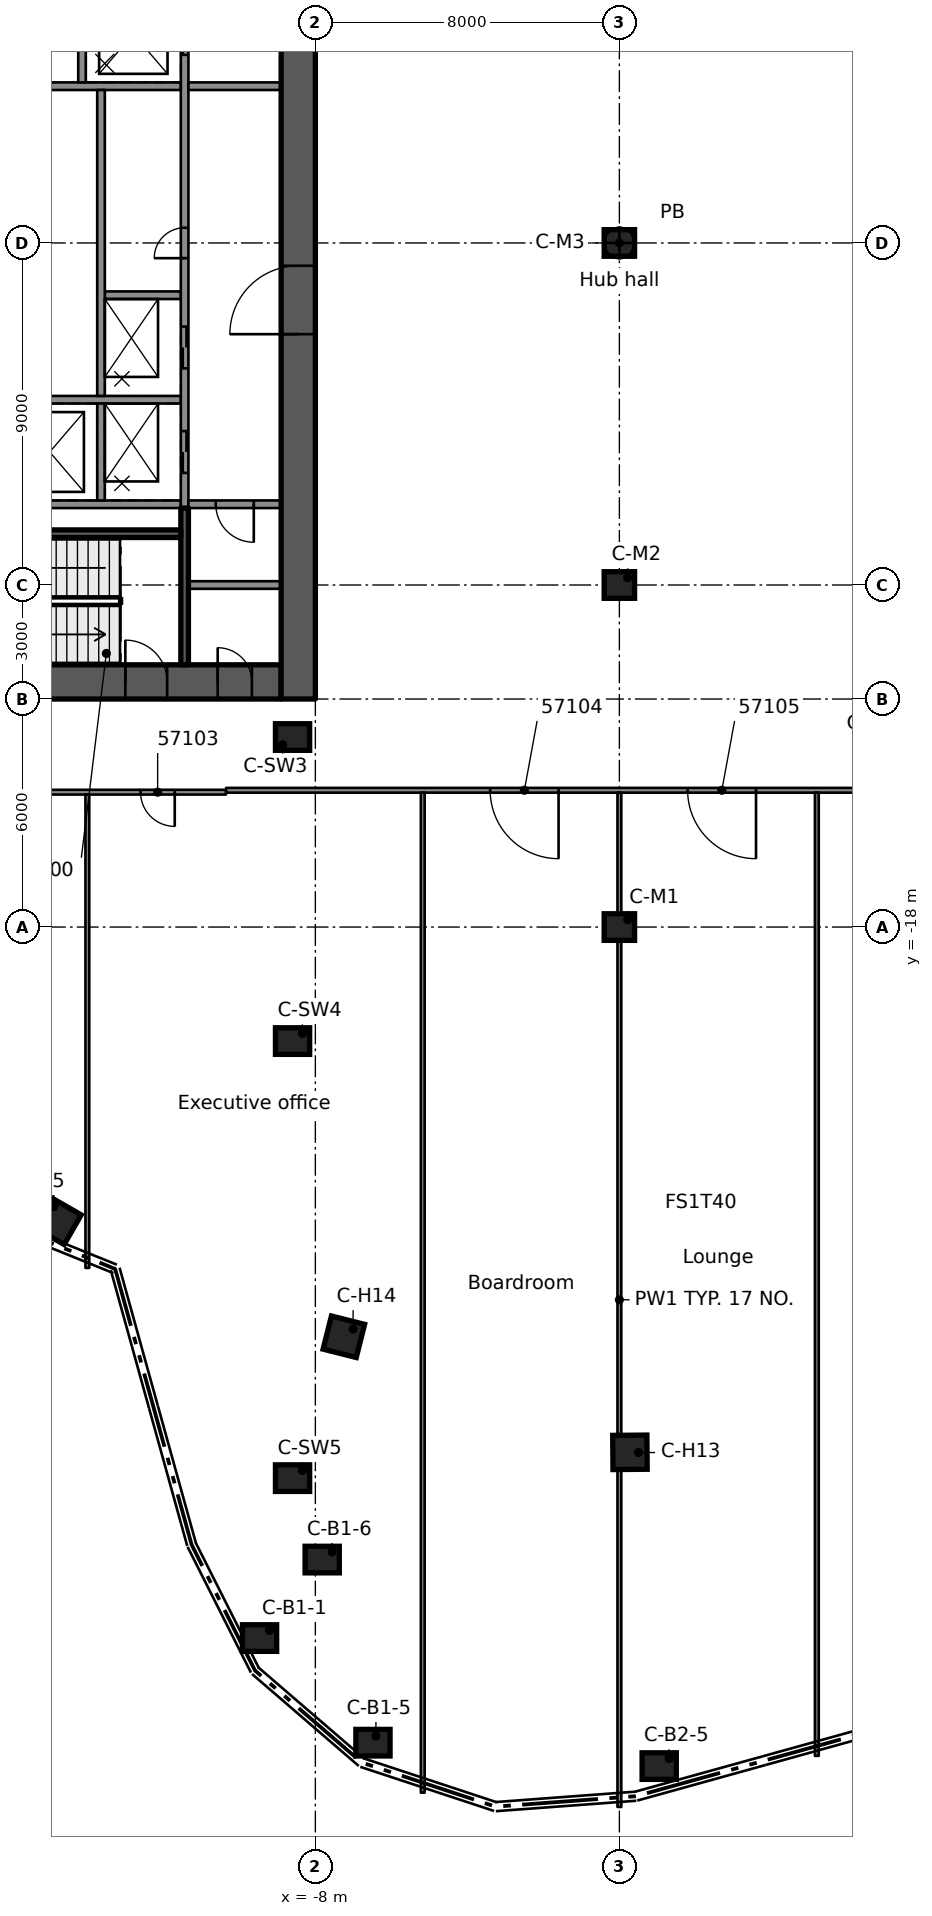
"""IFC4 building model, lengths in metres.
Left out: names, types, materials, properties, quantities, classifications, styles, units other than length and angle.
Written with IfcOpenShell. Run it as: python <this file> out.ifc"""

import sys

from ifc_helpers import new_model, si_unit, direction, frame, frame_2d, origin, origin_2d, place, context, subcontext, project, spatial, rectangle, extrude, element, fill, save


model = new_model("IFC4")
c1 = context("Model", 3, precision=1e-05, world=origin(), true_north=direction((0.0, 1.0)))
c2 = subcontext(c1, "Body", "Model", "MODEL_VIEW")
j1 = project(units=[si_unit("LENGTHUNIT", "METRE"), si_unit("PLANEANGLEUNIT", "RADIAN")], contexts=[c1])
p1 = place(None, origin())
s1 = spatial("IfcSite", under=j1, at=p1, CompositionType="ELEMENT")
p2 = place(p1, origin())
s2 = spatial("IfcBuilding", under=s1, at=p2, CompositionType="ELEMENT")
p3 = place(p2, frame((0.0, 0.0, 282.4)))
s3 = spatial("IfcBuildingStorey", under=s2, at=p3, CompositionType="ELEMENT", Elevation=282.4)
p4 = place(p3, frame((-18.1, -11.55, 0.0), z_axis=(0.0, 0.0, 1.0), x_axis=(1.0, 0.0, 0.0)))
e1 = element("IfcWall", 1, at=p4, inside=s3, PredefinedType="SHEAR", context=c2, shape_type="SweptSolid", body=[
    extrude(rectangle(XDim=9.2, YDim=0.9, at=frame_2d((4.6, 0.0))), origin(), (0.0, 0.0, 1.0), 3.5),
])
p5 = place(p4, frame((5.1, 0.0, 0.0)))
e2 = element("IfcOpeningElement", 2, at=p5, cuts=e1, PredefinedType="OPENING", context=c2, shape_type="SweptSolid", body=[
    extrude(rectangle(XDim=1.1, YDim=2.1, at=frame_2d((0.55, 1.05))), frame((0.0, 0.46, 0.0), z_axis=(0.0, -1.0, 0.0), x_axis=(1.0, 0.0, 0.0)), (0.0, 0.0, 1.0), 0.92),
])
p6 = place(p4, frame((7.53, 0.0, 0.0)))
e3 = element("IfcOpeningElement", 3, at=p6, cuts=e1, PredefinedType="OPENING", context=c2, shape_type="SweptSolid", body=[
    extrude(rectangle(XDim=0.9, YDim=2.1, at=frame_2d((0.45, 1.05))), frame((0.0, 0.46, 0.0), z_axis=(0.0, -1.0, 0.0), x_axis=(1.0, 0.0, 0.0)), (0.0, 0.0, 1.0), 0.92),
])
p7 = place(p3, frame((-8.45, -12.0, 0.0), z_axis=(0.0, 0.0, 1.0), x_axis=(0.0, 1.0, 0.0)))
e4 = element("IfcWall", 4, at=p7, inside=s3, PredefinedType="SHEAR", context=c2, shape_type="SweptSolid", body=[
    extrude(rectangle(XDim=24.0, YDim=0.9, at=frame_2d((12.0, 0.0))), origin(), (0.0, 0.0, 1.0), 3.5),
])
p8 = place(p7, frame((9.6, 0.0, 0.0)))
e5 = element("IfcOpeningElement", 5, at=p8, cuts=e4, PredefinedType="OPENING", context=c2, shape_type="SweptSolid", body=[
    extrude(rectangle(XDim=1.8, YDim=2.1, at=frame_2d((0.9, 1.05))), frame((0.0, 0.46, 0.0), z_axis=(0.0, -1.0, 0.0), x_axis=(1.0, 0.0, 0.0)), (0.0, 0.0, 1.0), 0.92),
])
p9 = place(p7, frame((19.65, 0.0, 0.0)))
e6 = element("IfcOpeningElement", 6, at=p9, cuts=e4, PredefinedType="OPENING", context=c2, shape_type="SweptSolid", body=[
    extrude(rectangle(XDim=1.1, YDim=2.1, at=frame_2d((0.55, 1.05))), frame((0.0, 0.46, 0.0), z_axis=(0.0, -1.0, 0.0), x_axis=(1.0, 0.0, 0.0)), (0.0, 0.0, 1.0), 0.92),
])
for number, where, z_axis, x_axis in (
    (7, (-9.468, -36.708, 0.0), (0.0, 0.0, 1.0), (1.0, 0.0, 0.0)),
    (8, (-6.484, -39.461, 0.0), (0.0, 0.0, 1.0), (1.0, 0.0, 0.0)),
    (9, (-7.82, -34.643, 0.0), (0.0, 0.0, 1.0), (1.0, 0.0, 0.0)),
    (10, (1.048, -40.077, 0.0), (0.0, 0.0, 1.0), (1.0, 0.0, 0.0)),
):
    element("IfcColumn", number, at=place(p3, frame(where, z_axis=z_axis, x_axis=x_axis)), inside=s3, PredefinedType="COLUMN", context=c2, shape_type="SweptSolid", body=[
        extrude(rectangle(XDim=0.9, YDim=0.7, at=origin_2d()), origin(), (0.0, 0.0, 1.0), 3.5),
    ])
for number, where, z_axis, x_axis in (
    (11, (0.278, -31.821, 0.0), (0.0, 0.0, 1.0), (0.009, -1.0, 0.0)),
    (12, (-7.25, -28.78, 0.0), (0.0, 0.0, 1.0), (-0.244, -0.97, 0.0)),
    (13, (-14.777, -25.739, 0.0), (0.0, 0.0, 1.0), (-0.498, -0.867, 0.0)),
):
    element("IfcColumn", number, at=place(p3, frame(where, z_axis=z_axis, x_axis=x_axis)), inside=s3, PredefinedType="COLUMN", context=c2, shape_type="SweptSolid", body=[
        extrude(rectangle(XDim=0.9, YDim=0.9, at=origin_2d()), origin(), (0.0, 0.0, 1.0), 3.5),
    ])
for number, where, z_axis, x_axis in (
    (14, (0.0, -18.0, 0.0), (0.0, 0.0, 1.0), (1.0, 0.0, 0.0)),
    (15, (0.0, -9.0, 0.0), (0.0, 0.0, 1.0), (1.0, 0.0, 0.0)),
    (16, (0.0, 0.0, 0.0), (0.0, 0.0, 1.0), (1.0, 0.0, 0.0)),
):
    element("IfcColumn", number, at=place(p3, frame(where, z_axis=z_axis, x_axis=x_axis)), inside=s3, PredefinedType="COLUMN", context=c2, shape_type="SweptSolid", body=[
        extrude(rectangle(XDim=0.8, YDim=0.7, at=origin_2d()), origin(), (0.0, 0.0, 1.0), 3.5),
    ])
for number, where, z_axis, x_axis in (
    (17, (-8.6, -13.0, 0.0), (0.0, 0.0, 1.0), (1.0, 0.0, 0.0)),
    (18, (-8.6, -21.0, 0.0), (0.0, 0.0, 1.0), (1.0, 0.0, 0.0)),
    (19, (-8.6, -32.5, 0.0), (0.0, 0.0, 1.0), (1.0, 0.0, 0.0)),
):
    element("IfcColumn", number, at=place(p3, frame(where, z_axis=z_axis, x_axis=x_axis)), inside=s3, PredefinedType="COLUMN", context=c2, shape_type="SweptSolid", body=[
        extrude(rectangle(XDim=0.9, YDim=0.7, at=origin_2d()), origin(), (0.0, 0.0, 1.0), 3.5),
    ])
p10 = place(p3, frame((-11.54, -6.875, 0.0), z_axis=(0.0, 0.0, 1.0), x_axis=(-1.0, 0.0, 0.0)))
e20 = element("IfcWall", 20, at=p10, inside=s3, PredefinedType="SOLIDWALL", context=c2, shape_type="SweptSolid", body=[
    extrude(rectangle(XDim=6.56, YDim=0.2, at=frame_2d((3.28, 0.0))), origin(), (0.0, 0.0, 1.0), 3.09),
])
p11 = place(p3, frame((-11.54, -4.125, 0.0), z_axis=(0.0, 0.0, 1.0), x_axis=(-1.0, 0.0, 0.0)))
e21 = element("IfcWall", 21, at=p11, inside=s3, PredefinedType="SOLIDWALL", context=c2, shape_type="SweptSolid", body=[
    extrude(rectangle(XDim=4.7, YDim=0.2, at=frame_2d((2.35, 0.0))), origin(), (0.0, 0.0, 1.0), 3.09),
])
p12 = place(p3, frame((-11.54, -1.375, 0.0), z_axis=(0.0, 0.0, 1.0), x_axis=(-1.0, 0.0, 0.0)))
e22 = element("IfcWall", 22, at=p12, inside=s3, PredefinedType="SOLIDWALL", context=c2, shape_type="SweptSolid", body=[
    extrude(rectangle(XDim=2.0, YDim=0.2, at=frame_2d((1.0, 0.0))), origin(), (0.0, 0.0, 1.0), 3.09),
])
p13 = place(p3, frame((-11.54, 4.125, 0.0), z_axis=(0.0, 0.0, 1.0), x_axis=(-1.0, 0.0, 0.0)))
e23 = element("IfcWall", 23, at=p13, inside=s3, PredefinedType="SOLIDWALL", context=c2, shape_type="SweptSolid", body=[
    extrude(rectangle(XDim=4.7, YDim=0.2, at=frame_2d((2.35, 0.0))), origin(), (0.0, 0.0, 1.0), 3.09),
])
p14 = place(p3, frame((-11.44, -6.975, 0.0), z_axis=(0.0, 0.0, 1.0), x_axis=(0.0, 1.0, 0.0)))
e24 = element("IfcWall", 24, at=p14, inside=s3, PredefinedType="SOLIDWALL", context=c2, shape_type="SweptSolid", body=[
    extrude(rectangle(XDim=13.95, YDim=0.2, at=frame_2d((6.975, 0.0))), origin(), (0.0, 0.0, 1.0), 3.09),
])
p15 = place(p14, frame((0.925, 0.0, 0.0)))
e25 = element("IfcOpeningElement", 25, at=p15, cuts=e24, PredefinedType="OPENING", context=c2, shape_type="SweptSolid", body=[
    extrude(rectangle(XDim=1.1, YDim=2.1, at=frame_2d((0.55, 1.05))), frame((0.0, 0.11, 0.0), z_axis=(0.0, -1.0, 0.0), x_axis=(1.0, 0.0, 0.0)), (0.0, 0.0, 1.0), 0.22),
])
p16 = place(p14, frame((3.675, 0.0, 0.0)))
e26 = element("IfcOpeningElement", 26, at=p16, cuts=e24, PredefinedType="OPENING", context=c2, shape_type="SweptSolid", body=[
    extrude(rectangle(XDim=1.1, YDim=2.1, at=frame_2d((0.55, 1.05))), frame((0.0, 0.11, 0.0), z_axis=(0.0, -1.0, 0.0), x_axis=(1.0, 0.0, 0.0)), (0.0, 0.0, 1.0), 0.22),
])
p17 = place(p14, frame((11.925, 0.0, 0.0)))
e27 = element("IfcOpeningElement", 27, at=p17, cuts=e24, PredefinedType="OPENING", context=c2, shape_type="SweptSolid", body=[
    extrude(rectangle(XDim=1.1, YDim=2.1, at=frame_2d((0.55, 1.05))), frame((0.0, 0.11, 0.0), z_axis=(0.0, -1.0, 0.0), x_axis=(1.0, 0.0, 0.0)), (0.0, 0.0, 1.0), 0.22),
])
p18 = place(p14, frame((6.575, 0.0, 0.0)))
e28 = element("IfcOpeningElement", 28, at=p18, cuts=e24, PredefinedType="OPENING", context=c2, shape_type="SweptSolid", body=[
    extrude(rectangle(XDim=0.8, YDim=2.1, at=frame_2d((0.4, 1.05))), frame((0.0, 0.11, 0.0), z_axis=(0.0, -1.0, 0.0), x_axis=(1.0, 0.0, 0.0)), (0.0, 0.0, 1.0), 0.22),
])
p19 = place(p3, frame((-13.64, -6.775, 0.0), z_axis=(0.0, 0.0, 1.0), x_axis=(0.0, 1.0, 0.0)))
e29 = element("IfcWall", 29, at=p19, inside=s3, PredefinedType="SOLIDWALL", context=c2, shape_type="SweptSolid", body=[
    extrude(rectangle(XDim=2.55, YDim=0.2, at=frame_2d((1.275, 0.0))), origin(), (0.0, 0.0, 1.0), 3.09),
])
p20 = place(p3, frame((-13.64, -4.025, 0.0), z_axis=(0.0, 0.0, 1.0), x_axis=(0.0, 1.0, 0.0)))
e30 = element("IfcWall", 30, at=p20, inside=s3, PredefinedType="SOLIDWALL", context=c2, shape_type="SweptSolid", body=[
    extrude(rectangle(XDim=8.05, YDim=0.2, at=frame_2d((4.025, 0.0))), origin(), (0.0, 0.0, 1.0), 3.09),
])
p21 = place(p3, frame((-14.14, 4.225, 0.0), z_axis=(0.0, 0.0, 1.0), x_axis=(0.0, 1.0, 0.0)))
e31 = element("IfcWall", 31, at=p21, inside=s3, PredefinedType="SOLIDWALL", context=c2, shape_type="SweptSolid", body=[
    extrude(rectangle(XDim=2.55, YDim=0.2, at=frame_2d((1.275, 0.0))), origin(), (0.0, 0.0, 1.0), 3.09),
])
p22 = place(p3, frame((-11.44, -11.1, 0.0), z_axis=(0.0, 0.0, 1.0), x_axis=(0.0, 1.0, 0.0)))
e32 = element("IfcWall", 32, at=p22, inside=s3, PredefinedType="SOLIDWALL", context=c2, shape_type="SweptSolid", body=[
    extrude(rectangle(XDim=4.125, YDim=0.2, at=frame_2d((2.062, 0.0))), origin(), (0.0, 0.0, 1.0), 3.09),
])
p23 = place(p3, frame((-11.54, -7.65, 0.0), z_axis=(0.0, 0.0, 1.0), x_axis=(-1.0, 0.0, 0.0)))
e33 = element("IfcWall", 33, at=p23, inside=s3, PredefinedType="SOLIDWALL", context=c2, shape_type="SweptSolid", body=[
    extrude(rectangle(XDim=6.56, YDim=0.2, at=frame_2d((3.28, 0.0))), origin(), (0.0, 0.0, 1.0), 3.09),
])
p24 = place(p3, frame((-8.9, 4.125, 0.0), z_axis=(0.0, 0.0, 1.0), x_axis=(-1.0, 0.0, 0.0)))
e34 = element("IfcWall", 34, at=p24, inside=s3, PredefinedType="PARTITIONING", context=c2, shape_type="SweptSolid", body=[
    extrude(rectangle(XDim=2.44, YDim=0.2, at=frame_2d((1.22, 0.0))), origin(), (0.0, 0.0, 1.0), 3.09),
])
p25 = place(p3, frame((-8.9, -6.875, 0.0), z_axis=(0.0, 0.0, 1.0), x_axis=(-1.0, 0.0, 0.0)))
e35 = element("IfcWall", 35, at=p25, inside=s3, PredefinedType="PARTITIONING", context=c2, shape_type="SweptSolid", body=[
    extrude(rectangle(XDim=2.44, YDim=0.2, at=frame_2d((1.22, 0.0))), origin(), (0.0, 0.0, 1.0), 3.09),
])
p26 = place(p25, frame((0.72, 0.0, 0.0)))
e36 = element("IfcOpeningElement", 36, at=p26, cuts=e35, PredefinedType="OPENING", context=c2, shape_type="SweptSolid", body=[
    extrude(rectangle(XDim=1.0, YDim=2.1, at=frame_2d((0.5, 1.05))), frame((0.0, 0.11, 0.0), z_axis=(0.0, -1.0, 0.0), x_axis=(1.0, 0.0, 0.0)), (0.0, 0.0, 1.0), 0.22),
])
p27 = place(p3, frame((-8.9, -9.0, 0.0), z_axis=(0.0, 0.0, 1.0), x_axis=(-1.0, 0.0, 0.0)))
e37 = element("IfcWall", 37, at=p27, inside=s3, PredefinedType="PARTITIONING", context=c2, shape_type="SweptSolid", body=[
    extrude(rectangle(XDim=2.44, YDim=0.2, at=frame_2d((1.22, 0.0))), origin(), (0.0, 0.0, 1.0), 3.09),
])
p28 = place(p3, frame((-10.35, -14.451, 0.0), z_axis=(0.0, 0.0, 1.0), x_axis=(-1.0, 0.0, 0.0)))
e38 = element("IfcWall", 38, at=p28, inside=s3, PredefinedType="PARTITIONING", context=c2, shape_type="SweptSolid", body=[
    extrude(rectangle(XDim=11.037, YDim=0.125, at=frame_2d((5.519, 0.0))), origin(), (0.0, 0.0, 1.0), 3.08),
])
p29 = place(p28, frame((7.0, 0.0, 0.0)))
e39 = element("IfcOpeningElement", 39, at=p29, cuts=e38, PredefinedType="OPENING", context=c2, shape_type="SweptSolid", body=[
    extrude(rectangle(XDim=0.9, YDim=2.1, at=frame_2d((0.45, 1.05))), frame((0.0, 0.073, 0.0), z_axis=(0.0, -1.0, 0.0), x_axis=(1.0, 0.0, 0.0)), (0.0, 0.0, 1.0), 0.145),
])
p30 = place(p28, frame((1.35, 0.0, 0.0)))
e40 = element("IfcOpeningElement", 40, at=p30, cuts=e38, PredefinedType="OPENING", context=c2, shape_type="SweptSolid", body=[
    extrude(rectangle(XDim=0.9, YDim=2.1, at=frame_2d((0.45, 1.05))), frame((0.0, 0.073, 0.0), z_axis=(0.0, -1.0, 0.0), x_axis=(1.0, 0.0, 0.0)), (0.0, 0.0, 1.0), 0.145),
])
p31 = place(p3, frame((10.391, -14.401, 0.0), z_axis=(0.0, 0.0, 1.0), x_axis=(-1.0, 0.0, 0.0)))
e41 = element("IfcWall", 41, at=p31, inside=s3, PredefinedType="PARTITIONING", context=c2, shape_type="SweptSolid", body=[
    extrude(rectangle(XDim=20.74, YDim=0.125, at=frame_2d((10.37, 0.0))), origin(), (0.0, 0.0, 1.0), 3.08),
])
p32 = place(p31, frame((11.991, 0.0, 0.0)))
e42 = element("IfcOpeningElement", 42, at=p32, cuts=e41, PredefinedType="OPENING", context=c2, shape_type="SweptSolid", body=[
    extrude(rectangle(XDim=1.8, YDim=2.1, at=frame_2d((0.9, 1.05))), frame((0.0, 0.073, 0.0), z_axis=(0.0, -1.0, 0.0), x_axis=(1.0, 0.0, 0.0)), (0.0, 0.0, 1.0), 0.145),
])
p33 = place(p31, frame((6.795, 0.0, 0.0)))
e43 = element("IfcOpeningElement", 43, at=p33, cuts=e41, PredefinedType="OPENING", context=c2, shape_type="SweptSolid", body=[
    extrude(rectangle(XDim=1.8, YDim=2.1, at=frame_2d((0.9, 1.05))), frame((0.0, 0.073, 0.0), z_axis=(0.0, -1.0, 0.0), x_axis=(1.0, 0.0, 0.0)), (0.0, 0.0, 1.0), 0.145),
])
p34 = place(p3, frame((5.196, -39.808, 0.0), z_axis=(0.0, 0.0, 1.0), x_axis=(0.0, 1.0, 0.0)))
e44 = element("IfcWall", 44, at=p34, inside=s3, PredefinedType="PARTITIONING", context=c2, shape_type="SweptSolid", body=[
    extrude(rectangle(XDim=25.345, YDim=0.1, at=frame_2d((12.673, 0.0))), origin(), (0.0, 0.0, 1.0), 3.08),
])
p35 = place(p3, frame((0.0, -41.152, 0.0), z_axis=(0.0, 0.0, 1.0), x_axis=(0.0, 1.0, 0.0)))
e45 = element("IfcWall", 45, at=p35, inside=s3, PredefinedType="PARTITIONING", context=c2, shape_type="SweptSolid", body=[
    extrude(rectangle(XDim=26.689, YDim=0.1, at=frame_2d((13.345, 0.0))), origin(), (0.0, 0.0, 1.0), 3.08),
])
p36 = place(p3, frame((-5.174, -40.776, 0.0), z_axis=(0.0, 0.0, 1.0), x_axis=(0.0, 1.0, 0.0)))
e46 = element("IfcWall", 46, at=p36, inside=s3, PredefinedType="PARTITIONING", context=c2, shape_type="SweptSolid", body=[
    extrude(rectangle(XDim=26.313, YDim=0.1, at=frame_2d((13.156, 0.0))), origin(), (0.0, 0.0, 1.0), 3.08),
])
p37 = place(p3, frame((-14.0, -26.969, 0.0), z_axis=(0.0, 0.0, 1.0), x_axis=(0.0, 1.0, 0.0)))
e47 = element("IfcWall", 47, at=p37, inside=s3, PredefinedType="PARTITIONING", context=c2, shape_type="SweptSolid", body=[
    extrude(rectangle(XDim=12.455, YDim=0.1, at=frame_2d((6.228, 0.0))), origin(), (0.0, 0.0, 1.0), 3.08),
])
p38 = place(p15, origin())
e48 = element("IfcDoor", 48, at=p38, inside=s3, OperationType="DOUBLE_DOOR_SLIDING", PredefinedType="DOOR", context=c2, shape_type="SweptSolid", body=[
    extrude(rectangle(XDim=1.1, YDim=2.1, at=frame_2d((0.55, 1.05))), frame((0.0, 0.025, 0.0), z_axis=(0.0, -1.0, 0.0), x_axis=(1.0, 0.0, 0.0)), (0.0, 0.0, 1.0), 0.05),
])
fill(e25, e48)
p39 = place(p16, origin())
e49 = element("IfcDoor", 49, at=p39, inside=s3, OperationType="DOUBLE_DOOR_SLIDING", PredefinedType="DOOR", context=c2, shape_type="SweptSolid", body=[
    extrude(rectangle(XDim=1.1, YDim=2.1, at=frame_2d((0.55, 1.05))), frame((0.0, 0.025, 0.0), z_axis=(0.0, -1.0, 0.0), x_axis=(1.0, 0.0, 0.0)), (0.0, 0.0, 1.0), 0.05),
])
fill(e26, e49)
p40 = place(p17, origin())
e50 = element("IfcDoor", 50, at=p40, inside=s3, OperationType="DOUBLE_DOOR_SLIDING", PredefinedType="DOOR", context=c2, shape_type="SweptSolid", body=[
    extrude(rectangle(XDim=1.1, YDim=2.1, at=frame_2d((0.55, 1.05))), frame((0.0, 0.025, 0.0), z_axis=(0.0, -1.0, 0.0), x_axis=(1.0, 0.0, 0.0)), (0.0, 0.0, 1.0), 0.05),
])
fill(e27, e50)
p41 = place(p18, origin())
e51 = element("IfcDoor", 51, at=p41, inside=s3, OperationType="SINGLE_SWING_LEFT", PredefinedType="DOOR", context=c2, shape_type="SweptSolid", body=[
    extrude(rectangle(XDim=0.8, YDim=2.1, at=frame_2d((0.4, 1.05))), frame((0.0, 0.025, 0.0), z_axis=(0.0, -1.0, 0.0), x_axis=(1.0, 0.0, 0.0)), (0.0, 0.0, 1.0), 0.05),
])
fill(e28, e51)
p42 = place(p8, origin())
e52 = element("IfcDoor", 52, at=p42, inside=s3, OperationType="SINGLE_SWING_LEFT", PredefinedType="DOOR", context=c2, shape_type="SweptSolid", body=[
    extrude(rectangle(XDim=1.8, YDim=2.1, at=frame_2d((0.9, 1.05))), frame((0.0, 0.025, 0.0), z_axis=(0.0, -1.0, 0.0), x_axis=(1.0, 0.0, 0.0)), (0.0, 0.0, 1.0), 0.05),
])
fill(e5, e52)
p43 = place(p5, origin())
e53 = element("IfcDoor", 53, at=p43, inside=s3, OperationType="SINGLE_SWING_RIGHT", PredefinedType="DOOR", context=c2, shape_type="SweptSolid", body=[
    extrude(rectangle(XDim=1.1, YDim=2.1, at=frame_2d((0.55, 1.05))), frame((0.0, 0.025, 0.0), z_axis=(0.0, -1.0, 0.0), x_axis=(1.0, 0.0, 0.0)), (0.0, 0.0, 1.0), 0.05),
])
fill(e2, e53)
p44 = place(p6, origin())
e54 = element("IfcDoor", 54, at=p44, inside=s3, OperationType="SINGLE_SWING_RIGHT", PredefinedType="DOOR", context=c2, shape_type="SweptSolid", body=[
    extrude(rectangle(XDim=0.9, YDim=2.1, at=frame_2d((0.45, 1.05))), frame((0.0, 0.025, 0.0), z_axis=(0.0, -1.0, 0.0), x_axis=(1.0, 0.0, 0.0)), (0.0, 0.0, 1.0), 0.05),
])
fill(e3, e54)
p45 = place(p26, origin())
e55 = element("IfcDoor", 55, at=p45, inside=s3, OperationType="SINGLE_SWING_RIGHT", PredefinedType="DOOR", context=c2, shape_type="SweptSolid", body=[
    extrude(rectangle(XDim=1.0, YDim=2.1, at=frame_2d((0.5, 1.05))), frame((0.0, 0.025, 0.0), z_axis=(0.0, -1.0, 0.0), x_axis=(1.0, 0.0, 0.0)), (0.0, 0.0, 1.0), 0.05),
])
fill(e36, e55)
p46 = place(p30, origin())
e56 = element("IfcDoor", 56, at=p46, inside=s3, OperationType="SINGLE_SWING_LEFT", PredefinedType="DOOR", context=c2, shape_type="SweptSolid", body=[
    extrude(rectangle(XDim=0.9, YDim=2.1, at=frame_2d((0.45, 1.05))), frame((0.0, 0.025, 0.0), z_axis=(0.0, -1.0, 0.0), x_axis=(1.0, 0.0, 0.0)), (0.0, 0.0, 1.0), 0.05),
])
fill(e40, e56)
p47 = place(p32, origin())
e57 = element("IfcDoor", 57, at=p47, inside=s3, OperationType="DOUBLE_DOOR_SINGLE_SWING", PredefinedType="DOOR", context=c2, shape_type="SweptSolid", body=[
    extrude(rectangle(XDim=1.8, YDim=2.1, at=frame_2d((0.9, 1.05))), frame((0.0, 0.025, 0.0), z_axis=(0.0, -1.0, 0.0), x_axis=(1.0, 0.0, 0.0)), (0.0, 0.0, 1.0), 0.05),
])
fill(e42, e57)
p48 = place(p33, origin())
e58 = element("IfcDoor", 58, at=p48, inside=s3, OperationType="DOUBLE_DOOR_SINGLE_SWING", PredefinedType="DOOR", context=c2, shape_type="SweptSolid", body=[
    extrude(rectangle(XDim=1.8, YDim=2.1, at=frame_2d((0.9, 1.05))), frame((0.0, 0.025, 0.0), z_axis=(0.0, -1.0, 0.0), x_axis=(1.0, 0.0, 0.0)), (0.0, 0.0, 1.0), 0.05),
])
fill(e43, e58)
save(model, sys.argv[1])
